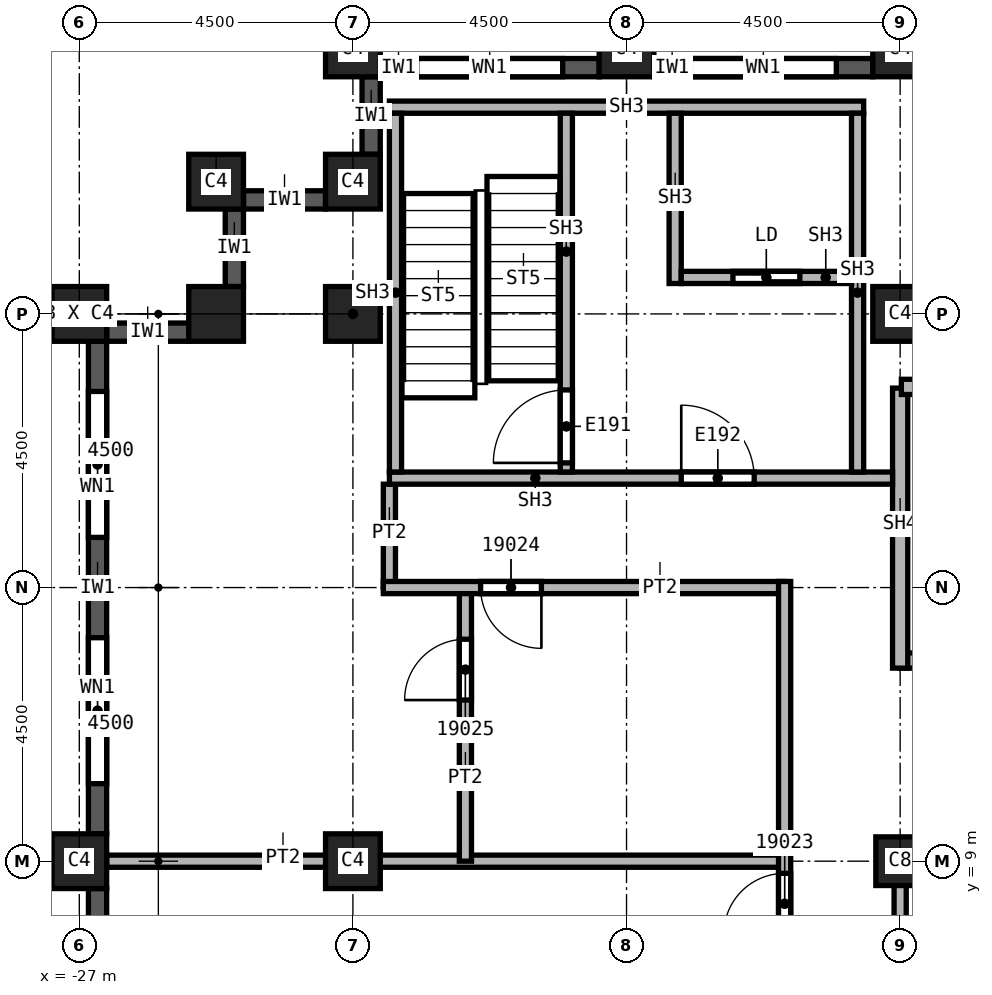
"""IFC4 building model, lengths in metres.
Left out: names, types, materials, properties, quantities, classifications, styles, units other than length and angle.
Written with IfcOpenShell. Run it as: python <this file> out.ifc"""

import sys

from ifc_helpers import new_model, si_unit, direction, frame, frame_2d, origin, origin_2d, place, context, subcontext, project, spatial, rectangle, extrude, element, fill, save


model = new_model("IFC4")
c1 = context("Model", 3, precision=1e-05, world=origin(), true_north=direction((0.0, 1.0)))
c2 = subcontext(c1, "Body", "Model", "MODEL_VIEW")
j1 = project(units=[si_unit("LENGTHUNIT", "METRE"), si_unit("PLANEANGLEUNIT", "RADIAN")], contexts=[c1])
p1 = place(None, origin())
s1 = spatial("IfcSite", under=j1, at=p1, CompositionType="ELEMENT")
p2 = place(p1, origin())
s2 = spatial("IfcBuilding", under=s1, at=p2, CompositionType="ELEMENT")
p3 = place(p2, frame((0.0, 0.0, 278.0)))
s3 = spatial("IfcBuildingStorey", under=s2, at=p3, CompositionType="ELEMENT", Elevation=278.0)
for number, where, z_axis, x_axis in (
    (1, (-13.5, 18.0, 0.0), (0.0, 0.0, 1.0), (1.0, 0.0, 0.0)),
    (2, (-22.5, 9.0, 0.0), (0.0, 0.0, 1.0), (1.0, 0.0, 0.0)),
    (3, (-22.5, 18.0, 0.0), (0.0, 0.0, 1.0), (1.0, 0.0, 0.0)),
):
    element("IfcColumn", number, at=place(p3, frame(where, z_axis=z_axis, x_axis=x_axis)), inside=s3, PredefinedType="COLUMN", context=c2, shape_type="SweptSolid", body=[
        extrude(rectangle(XDim=0.9, YDim=0.9, at=origin_2d()), origin(), (0.0, 0.0, 1.0), 3.72),
    ])
p4 = place(p3, frame((-13.5, 9.0, 0.0), z_axis=(0.0, 0.0, 1.0), x_axis=(1.0, 0.0, 0.0)))
e4 = element("IfcColumn", 4, at=p4, inside=s3, PredefinedType="COLUMN", context=c2, shape_type="SweptSolid", body=[
    extrude(rectangle(XDim=0.8, YDim=0.8, at=origin_2d()), origin(), (0.0, 0.0, 1.0), 3.72),
])
for number, where, z_axis, x_axis in (
    (5, (-13.5, 22.35, 0.0), (0.0, 0.0, 1.0), (1.0, 0.0, 0.0)),
    (6, (-18.0, 22.35, 0.0), (0.0, 0.0, 1.0), (1.0, 0.0, 0.0)),
    (7, (-22.5, 22.35, 0.0), (0.0, 0.0, 1.0), (1.0, 0.0, 0.0)),
    (8, (-27.0, 9.0, 0.0), (0.0, 0.0, 1.0), (0.0, 1.0, 0.0)),
    (9, (-27.0, 18.0, 0.0), (0.0, 0.0, 1.0), (0.0, 1.0, 0.0)),
    (10, (-22.5, 20.175, 0.0), (0.0, 0.0, 1.0), (1.0, 0.0, 0.0)),
    (11, (-24.75, 20.175, 0.0), (0.0, 0.0, 1.0), (1.0, 0.0, 0.0)),
    (12, (-24.75, 18.0, 0.0), (0.0, 0.0, 1.0), (1.0, 0.0, 0.0)),
):
    element("IfcColumn", number, at=place(p3, frame(where, z_axis=z_axis, x_axis=x_axis)), inside=s3, PredefinedType="COLUMN", context=c2, shape_type="SweptSolid", body=[
        extrude(rectangle(XDim=0.9, YDim=0.9, at=origin_2d()), origin(), (0.0, 0.0, 1.0), 3.72),
    ])
p5 = place(p3, frame((-24.45, 19.725, 0.0), z_axis=(0.0, 0.0, 1.0), x_axis=(0.0, -1.0, 0.0)))
e13 = element("IfcWall", 13, at=p5, inside=s3, PredefinedType="SOLIDWALL", context=c2, shape_type="SweptSolid", body=[
    extrude(rectangle(XDim=1.275, YDim=0.3, at=frame_2d((0.638, 0.0))), origin(), (0.0, 0.0, 1.0), 3.12),
])
p6 = place(p3, frame((-25.2, 17.7, 0.0), z_axis=(0.0, 0.0, 1.0), x_axis=(-1.0, 0.0, 0.0)))
e14 = element("IfcWall", 14, at=p6, inside=s3, PredefinedType="SOLIDWALL", context=c2, shape_type="SweptSolid", body=[
    extrude(rectangle(XDim=1.35, YDim=0.3, at=frame_2d((0.675, 0.0))), origin(), (0.0, 0.0, 1.0), 3.12),
])
p7 = place(p3, frame((-26.7, 17.55, 0.0), z_axis=(0.0, 0.0, 1.0), x_axis=(0.0, -1.0, 0.0)))
e15 = element("IfcWall", 15, at=p7, inside=s3, PredefinedType="SOLIDWALL", context=c2, shape_type="SweptSolid", body=[
    extrude(rectangle(XDim=8.1, YDim=0.3, at=frame_2d((4.05, 0.0))), origin(), (0.0, 0.0, 1.0), 3.12),
])
p8 = place(p7, frame((0.825, 0.0, 0.8)))
e16 = element("IfcOpeningElement", 16, at=p8, cuts=e15, PredefinedType="OPENING", context=c2, shape_type="SweptSolid", body=[
    extrude(rectangle(XDim=2.4, YDim=1.95, at=frame_2d((1.2, 0.975))), frame((0.0, 0.15, 0.0), z_axis=(0.0, -1.0, 0.0), x_axis=(1.0, 0.0, 0.0)), (0.0, 0.0, 1.0), 0.3),
])
p9 = place(p7, frame((4.875, 0.0, 0.8)))
e17 = element("IfcOpeningElement", 17, at=p9, cuts=e15, PredefinedType="OPENING", context=c2, shape_type="SweptSolid", body=[
    extrude(rectangle(XDim=2.4, YDim=1.95, at=frame_2d((1.2, 0.975))), frame((0.0, 0.15, 0.0), z_axis=(0.0, -1.0, 0.0), x_axis=(1.0, 0.0, 0.0)), (0.0, 0.0, 1.0), 0.3),
])
p10 = place(p3, frame((-26.7, 8.55, 0.0), z_axis=(0.0, 0.0, 1.0), x_axis=(0.0, -1.0, 0.0)))
e18 = element("IfcWall", 18, at=p10, inside=s3, PredefinedType="SOLIDWALL", context=c2, shape_type="SweptSolid", body=[
    extrude(rectangle(XDim=8.1, YDim=0.3, at=frame_2d((4.05, 0.0))), origin(), (0.0, 0.0, 1.0), 3.12),
])
p11 = place(p10, frame((0.825, 0.0, 0.8)))
e19 = element("IfcOpeningElement", 19, at=p11, cuts=e18, PredefinedType="OPENING", context=c2, shape_type="SweptSolid", body=[
    extrude(rectangle(XDim=2.4, YDim=1.95, at=frame_2d((1.2, 0.975))), frame((0.0, 0.15, 0.0), z_axis=(0.0, -1.0, 0.0), x_axis=(1.0, 0.0, 0.0)), (0.0, 0.0, 1.0), 0.3),
])
p12 = place(p10, frame((4.875, 0.0, 0.8)))
e20 = element("IfcOpeningElement", 20, at=p12, cuts=e18, PredefinedType="OPENING", context=c2, shape_type="SweptSolid", body=[
    extrude(rectangle(XDim=2.4, YDim=1.95, at=frame_2d((1.2, 0.975))), frame((0.0, 0.15, 0.0), z_axis=(0.0, -1.0, 0.0), x_axis=(1.0, 0.0, 0.0)), (0.0, 0.0, 1.0), 0.3),
])
p13 = place(p3, frame((-13.95, 22.05, 0.0), z_axis=(0.0, 0.0, 1.0), x_axis=(-1.0, 0.0, 0.0)))
e21 = element("IfcWall", 21, at=p13, inside=s3, PredefinedType="SOLIDWALL", context=c2, shape_type="SweptSolid", body=[
    extrude(rectangle(XDim=3.6, YDim=0.3, at=frame_2d((1.8, 0.0))), origin(), (0.0, 0.0, 1.0), 3.12),
])
p14 = place(p13, frame((0.6, 0.0, 0.8)))
e22 = element("IfcOpeningElement", 22, at=p14, cuts=e21, PredefinedType="OPENING", context=c2, shape_type="SweptSolid", body=[
    extrude(rectangle(XDim=2.4, YDim=1.95, at=frame_2d((1.2, 0.975))), frame((0.0, 0.15, 0.0), z_axis=(0.0, -1.0, 0.0), x_axis=(1.0, 0.0, 0.0)), (0.0, 0.0, 1.0), 0.3),
])
p15 = place(p3, frame((-18.45, 22.05, 0.0), z_axis=(0.0, 0.0, 1.0), x_axis=(-1.0, 0.0, 0.0)))
e23 = element("IfcWall", 23, at=p15, inside=s3, PredefinedType="SOLIDWALL", context=c2, shape_type="SweptSolid", body=[
    extrude(rectangle(XDim=3.6, YDim=0.3, at=frame_2d((1.8, 0.0))), origin(), (0.0, 0.0, 1.0), 3.12),
])
p16 = place(p15, frame((0.6, 0.0, 0.8)))
e24 = element("IfcOpeningElement", 24, at=p16, cuts=e23, PredefinedType="OPENING", context=c2, shape_type="SweptSolid", body=[
    extrude(rectangle(XDim=2.4, YDim=1.95, at=frame_2d((1.2, 0.975))), frame((0.0, 0.15, 0.0), z_axis=(0.0, -1.0, 0.0), x_axis=(1.0, 0.0, 0.0)), (0.0, 0.0, 1.0), 0.3),
])
p17 = place(p3, frame((-22.2, 21.9, 0.0), z_axis=(0.0, 0.0, 1.0), x_axis=(0.0, -1.0, 0.0)))
e25 = element("IfcWall", 25, at=p17, inside=s3, PredefinedType="SOLIDWALL", context=c2, shape_type="SweptSolid", body=[
    extrude(rectangle(XDim=1.275, YDim=0.3, at=frame_2d((0.637, 0.0))), origin(), (0.0, 0.0, 1.0), 3.12),
])
p18 = place(p3, frame((-22.95, 19.875, 0.0), z_axis=(0.0, 0.0, 1.0), x_axis=(-1.0, 0.0, 0.0)))
e26 = element("IfcWall", 26, at=p18, inside=s3, PredefinedType="SOLIDWALL", context=c2, shape_type="SweptSolid", body=[
    extrude(rectangle(XDim=1.35, YDim=0.3, at=frame_2d((0.675, 0.0))), origin(), (0.0, 0.0, 1.0), 3.12),
])
p19 = place(p3, frame((-26.55, 9.0, 0.0), z_axis=(0.0, 0.0, 1.0), x_axis=(1.0, 0.0, 0.0)))
e27 = element("IfcWall", 27, at=p19, inside=s3, PredefinedType="PARTITIONING", context=c2, shape_type="SweptSolid", body=[
    extrude(rectangle(XDim=11.15, YDim=0.2, at=frame_2d((5.575, 0.0))), origin(), (0.0, 0.0, 1.0), 3.72),
])
p20 = place(p3, frame((-21.9, 13.5, 0.0), z_axis=(0.0, 0.0, 1.0), x_axis=(0.0, 1.0, 0.0)))
e28 = element("IfcWall", 28, at=p20, inside=s3, PredefinedType="PARTITIONING", context=c2, shape_type="SweptSolid", body=[
    extrude(rectangle(XDim=1.7, YDim=0.2, at=frame_2d((0.85, 0.0))), origin(), (0.0, 0.0, 1.0), 3.72),
])
p21 = place(p3, frame((-20.65, 9.0, 0.0), z_axis=(0.0, 0.0, 1.0), x_axis=(0.0, 1.0, 0.0)))
e29 = element("IfcWall", 29, at=p21, inside=s3, PredefinedType="PARTITIONING", context=c2, shape_type="SweptSolid", body=[
    extrude(rectangle(XDim=4.5, YDim=0.2, at=frame_2d((2.25, 0.0))), origin(), (0.0, 0.0, 1.0), 3.72),
])
p22 = place(p21, frame((2.65, 0.0, 0.0)))
e30 = element("IfcOpeningElement", 30, at=p22, cuts=e29, PredefinedType="OPENING", context=c2, shape_type="SweptSolid", body=[
    extrude(rectangle(XDim=1.0, YDim=2.1, at=frame_2d((0.5, 1.05))), frame((0.0, 0.1, 0.0), z_axis=(0.0, -1.0, 0.0), x_axis=(1.0, 0.0, 0.0)), (0.0, 0.0, 1.0), 0.2),
])
p23 = place(p3, frame((-15.4, 13.5, 0.0), z_axis=(0.0, 0.0, 1.0), x_axis=(-1.0, 0.0, 0.0)))
e31 = element("IfcWall", 31, at=p23, inside=s3, PredefinedType="PARTITIONING", context=c2, shape_type="SweptSolid", body=[
    extrude(rectangle(XDim=6.6, YDim=0.2, at=frame_2d((3.3, 0.0))), origin(), (0.0, 0.0, 1.0), 3.72),
])
p24 = place(p23, frame((4.0, 0.0, 0.0)))
e32 = element("IfcOpeningElement", 32, at=p24, cuts=e31, PredefinedType="OPENING", context=c2, shape_type="SweptSolid", body=[
    extrude(rectangle(XDim=1.0, YDim=2.1, at=frame_2d((0.5, 1.05))), frame((0.0, 0.1, 0.0), z_axis=(0.0, -1.0, 0.0), x_axis=(1.0, 0.0, 0.0)), (0.0, 0.0, 1.0), 0.2),
])
p25 = place(p3, frame((-15.4, -21.9, 0.0), z_axis=(0.0, 0.0, 1.0), x_axis=(0.0, 1.0, 0.0)))
e33 = element("IfcWall", 33, at=p25, inside=s3, PredefinedType="PARTITIONING", context=c2, shape_type="SweptSolid", body=[
    extrude(rectangle(XDim=35.5, YDim=0.2, at=frame_2d((17.75, 0.0))), origin(), (0.0, 0.0, 1.0), 3.72),
])
p26 = place(p25, frame((22.05, 0.0, 0.0)))
e34 = element("IfcOpeningElement", 34, at=p26, cuts=e33, PredefinedType="OPENING", context=c2, shape_type="SweptSolid", body=[
    extrude(rectangle(XDim=1.0, YDim=2.1, at=frame_2d((0.5, 1.05))), frame((0.0, 0.1, 0.0), z_axis=(0.0, -1.0, 0.0), x_axis=(1.0, 0.0, 0.0)), (0.0, 0.0, 1.0), 0.2),
])
p27 = place(p25, frame((29.7, 0.0, 0.0)))
e35 = element("IfcOpeningElement", 35, at=p27, cuts=e33, PredefinedType="OPENING", context=c2, shape_type="SweptSolid", body=[
    extrude(rectangle(XDim=1.0, YDim=2.1, at=frame_2d((0.5, 1.05))), frame((0.0, 0.1, 0.0), z_axis=(0.0, -1.0, 0.0), x_axis=(1.0, 0.0, 0.0)), (0.0, 0.0, 1.0), 0.2),
])
p28 = place(p25, frame((1.0, 0.0, 0.0)))
e36 = element("IfcOpeningElement", 36, at=p28, cuts=e33, PredefinedType="OPENING", context=c2, shape_type="SweptSolid", body=[
    extrude(rectangle(XDim=1.0, YDim=2.1, at=frame_2d((0.5, 1.05))), frame((0.0, 0.1, 0.0), z_axis=(0.0, -1.0, 0.0), x_axis=(1.0, 0.0, 0.0)), (0.0, 0.0, 1.0), 0.2),
])
p29 = place(p25, frame((3.15, 0.0, 0.0)))
e37 = element("IfcOpeningElement", 37, at=p29, cuts=e33, PredefinedType="OPENING", context=c2, shape_type="SweptSolid", body=[
    extrude(rectangle(XDim=1.0, YDim=2.1, at=frame_2d((0.5, 1.05))), frame((0.0, 0.1, 0.0), z_axis=(0.0, -1.0, 0.0), x_axis=(1.0, 0.0, 0.0)), (0.0, 0.0, 1.0), 0.2),
])
p30 = place(p25, frame((8.4, 0.0, 0.0)))
e38 = element("IfcOpeningElement", 38, at=p30, cuts=e33, PredefinedType="OPENING", context=c2, shape_type="SweptSolid", body=[
    extrude(rectangle(XDim=1.0, YDim=2.1, at=frame_2d((0.5, 1.05))), frame((0.0, 0.1, 0.0), z_axis=(0.0, -1.0, 0.0), x_axis=(1.0, 0.0, 0.0)), (0.0, 0.0, 1.0), 0.2),
])
p31 = place(p25, frame((17.25, 0.0, 0.0)))
e39 = element("IfcOpeningElement", 39, at=p31, cuts=e33, PredefinedType="OPENING", context=c2, shape_type="SweptSolid", body=[
    extrude(rectangle(XDim=1.0, YDim=2.1, at=frame_2d((0.5, 1.05))), frame((0.0, 0.1, 0.0), z_axis=(0.0, -1.0, 0.0), x_axis=(1.0, 0.0, 0.0)), (0.0, 0.0, 1.0), 0.2),
])
p32 = place(p25, frame((20.625, 0.0, 0.0)))
e40 = element("IfcOpeningElement", 40, at=p32, cuts=e33, PredefinedType="OPENING", context=c2, shape_type="SweptSolid", body=[
    extrude(rectangle(XDim=1.0, YDim=2.1, at=frame_2d((0.5, 1.05))), frame((0.0, 0.1, 0.0), z_axis=(0.0, -1.0, 0.0), x_axis=(1.0, 0.0, 0.0)), (0.0, 0.0, 1.0), 0.2),
])
p33 = place(p3, frame((-13.5, 6.0, 0.0), z_axis=(0.0, 0.0, 1.0), x_axis=(0.0, 1.0, 0.0)))
e41 = element("IfcWall", 41, at=p33, inside=s3, PredefinedType="SOLIDWALL", context=c2, shape_type="SweptSolid", body=[
    extrude(rectangle(XDim=3.1, YDim=0.2, at=frame_2d((1.55, 0.0))), origin(), (0.0, 0.0, 1.0), 3.042),
])
p34 = place(p3, frame((-13.5, 9.0, 0.0), z_axis=(0.0, 0.0, 1.0), x_axis=(1.0, 0.0, 0.0)))
e42 = element("IfcWall", 42, at=p34, inside=s3, PredefinedType="SOLIDWALL", context=c2, shape_type="SweptSolid", body=[
    extrude(rectangle(XDim=3.0, YDim=0.2, at=frame_2d((1.5, 0.0))), origin(), (0.0, 0.0, 1.0), 3.042),
])
p35 = place(p3, frame((-13.5, 12.3, 0.0), z_axis=(0.0, 0.0, 1.0), x_axis=(1.0, 0.0, 0.0)))
e43 = element("IfcWall", 43, at=p35, inside=s3, PredefinedType="SOLIDWALL", context=c2, shape_type="SweptSolid", body=[
    extrude(rectangle(XDim=9.125, YDim=0.25, at=frame_2d((4.562, 0.0))), origin(), (0.0, 0.0, 1.0), 3.72),
])
p36 = place(p35, frame((0.6, 0.0, 0.0)))
e44 = element("IfcOpeningElement", 44, at=p36, cuts=e43, PredefinedType="OPENING", context=c2, shape_type="SweptSolid", body=[
    extrude(rectangle(XDim=1.2, YDim=2.1, at=frame_2d((0.6, 1.05))), frame((0.0, 0.125, 0.0), z_axis=(0.0, -1.0, 0.0), x_axis=(1.0, 0.0, 0.0)), (0.0, 0.0, 1.0), 0.25),
])
p37 = place(p3, frame((-13.5, 16.78, 0.0), z_axis=(0.0, 0.0, 1.0), x_axis=(0.0, -1.0, 0.0)))
e45 = element("IfcWall", 45, at=p37, inside=s3, PredefinedType="SOLIDWALL", context=c2, shape_type="SweptSolid", body=[
    extrude(rectangle(XDim=4.605, YDim=0.25, at=frame_2d((2.302, 0.0))), origin(), (0.0, 0.0, 1.0), 3.72),
])
p38 = place(p3, frame((-13.48, 16.8, 0.0), z_axis=(0.0, 0.0, 1.0), x_axis=(1.0, 0.0, 0.0)))
e46 = element("IfcWall", 46, at=p38, inside=s3, PredefinedType="SOLIDWALL", context=c2, shape_type="SweptSolid", body=[
    extrude(rectangle(XDim=8.96, YDim=0.25, at=frame_2d((4.48, 0.0))), origin(), (0.0, 0.0, 1.0), 3.72),
])
p39 = place(p3, frame((-21.9, 15.3, 0.0), z_axis=(0.0, 0.0, 1.0), x_axis=(1.0, 0.0, 0.0)))
e47 = element("IfcWall", 47, at=p39, inside=s3, PredefinedType="SOLIDWALL", context=c2, shape_type="SweptSolid", body=[
    extrude(rectangle(XDim=8.275, YDim=0.2, at=frame_2d((4.137, 0.0))), origin(), (0.0, 0.0, 1.0), 3.72),
])
p40 = place(p39, frame((4.8, 0.0, 0.0)))
e48 = element("IfcOpeningElement", 48, at=p40, cuts=e47, PredefinedType="OPENING", context=c2, shape_type="SweptSolid", body=[
    extrude(rectangle(XDim=1.2, YDim=2.1, at=frame_2d((0.6, 1.05))), frame((0.0, 0.1, 0.0), z_axis=(0.0, -1.0, 0.0), x_axis=(1.0, 0.0, 0.0)), (0.0, 0.0, 1.0), 0.2),
])
p41 = place(p3, frame((-21.9, 21.4, 0.0), z_axis=(0.0, 0.0, 1.0), x_axis=(1.0, 0.0, 0.0)))
e49 = element("IfcWall", 49, at=p41, inside=s3, PredefinedType="SOLIDWALL", context=c2, shape_type="SweptSolid", body=[
    extrude(rectangle(XDim=7.8, YDim=0.2, at=frame_2d((3.9, 0.0))), origin(), (0.0, 0.0, 1.0), 3.72),
])
for number, where, z_axis, x_axis in (
    (50, (-21.8, 15.4, 0.0), (0.0, 0.0, 1.0), (0.0, 1.0, 0.0)),
    (51, (-14.2, 15.4, 0.0), (0.0, 0.0, 1.0), (0.0, 1.0, 0.0)),
):
    element("IfcWall", number, at=place(p3, frame(where, z_axis=z_axis, x_axis=x_axis)), inside=s3, PredefinedType="SOLIDWALL", context=c2, shape_type="SweptSolid", body=[
        extrude(rectangle(XDim=5.9, YDim=0.2, at=frame_2d((2.95, 0.0))), origin(), (0.0, 0.0, 1.0), 3.72),
    ])
p42 = place(p3, frame((-18.99, 15.4, 0.0), z_axis=(0.0, 0.0, 1.0), x_axis=(0.0, 1.0, 0.0)))
e52 = element("IfcWall", 52, at=p42, inside=s3, PredefinedType="SOLIDWALL", context=c2, shape_type="SweptSolid", body=[
    extrude(rectangle(XDim=5.9, YDim=0.2, at=frame_2d((2.95, 0.0))), origin(), (0.0, 0.0, 1.0), 3.72),
])
p43 = place(p42, frame((0.15, 0.0, 0.0)))
e53 = element("IfcOpeningElement", 53, at=p43, cuts=e52, PredefinedType="OPENING", context=c2, shape_type="SweptSolid", body=[
    extrude(rectangle(XDim=1.2, YDim=2.1, at=frame_2d((0.6, 1.05))), frame((0.0, 0.1, 0.0), z_axis=(0.0, -1.0, 0.0), x_axis=(1.0, 0.0, 0.0)), (0.0, 0.0, 1.0), 0.2),
])
p44 = place(p3, frame((-17.2, 18.5, 0.0), z_axis=(0.0, 0.0, 1.0), x_axis=(0.0, 1.0, 0.0)))
e54 = element("IfcWall", 54, at=p44, inside=s3, PredefinedType="SOLIDWALL", context=c2, shape_type="SweptSolid", body=[
    extrude(rectangle(XDim=2.8, YDim=0.2, at=frame_2d((1.4, 0.0))), origin(), (0.0, 0.0, 1.0), 3.72),
])
p45 = place(p3, frame((-17.1, 18.6, 0.0), z_axis=(0.0, 0.0, 1.0), x_axis=(1.0, 0.0, 0.0)))
e55 = element("IfcWall", 55, at=p45, inside=s3, PredefinedType="SOLIDWALL", context=c2, shape_type="SweptSolid", body=[
    extrude(rectangle(XDim=2.8, YDim=0.2, at=frame_2d((1.4, 0.0))), origin(), (0.0, 0.0, 1.0), 3.72),
])
p46 = place(p45, frame((0.85, 0.0, 0.0)))
e56 = element("IfcOpeningElement", 56, at=p46, cuts=e55, PredefinedType="OPENING", context=c2, shape_type="SweptSolid", body=[
    extrude(rectangle(XDim=1.1, YDim=2.1, at=frame_2d((0.55, 1.05))), frame((0.0, 0.1, 0.0), z_axis=(0.0, -1.0, 0.0), x_axis=(1.0, 0.0, 0.0)), (0.0, 0.0, 1.0), 0.2),
])
p47 = place(p8, origin())
e57 = element("IfcWindow", 57, at=p47, inside=s3, PartitioningType="SINGLE_PANEL", PredefinedType="WINDOW", context=c2, shape_type="SweptSolid", body=[
    extrude(rectangle(XDim=2.4, YDim=1.95, at=frame_2d((1.2, 0.975))), frame((0.0, 0.03, 0.0), z_axis=(0.0, -1.0, 0.0), x_axis=(1.0, 0.0, 0.0)), (0.0, 0.0, 1.0), 0.06),
])
fill(e16, e57)
p48 = place(p9, origin())
e58 = element("IfcWindow", 58, at=p48, inside=s3, PartitioningType="SINGLE_PANEL", PredefinedType="WINDOW", context=c2, shape_type="SweptSolid", body=[
    extrude(rectangle(XDim=2.4, YDim=1.95, at=frame_2d((1.2, 0.975))), frame((0.0, 0.03, 0.0), z_axis=(0.0, -1.0, 0.0), x_axis=(1.0, 0.0, 0.0)), (0.0, 0.0, 1.0), 0.06),
])
fill(e17, e58)
p49 = place(p14, origin())
e59 = element("IfcWindow", 59, at=p49, inside=s3, PartitioningType="SINGLE_PANEL", PredefinedType="WINDOW", context=c2, shape_type="SweptSolid", body=[
    extrude(rectangle(XDim=2.4, YDim=1.95, at=frame_2d((1.2, 0.975))), frame((0.0, 0.03, 0.0), z_axis=(0.0, -1.0, 0.0), x_axis=(1.0, 0.0, 0.0)), (0.0, 0.0, 1.0), 0.06),
])
fill(e22, e59)
p50 = place(p16, origin())
e60 = element("IfcWindow", 60, at=p50, inside=s3, PartitioningType="SINGLE_PANEL", PredefinedType="WINDOW", context=c2, shape_type="SweptSolid", body=[
    extrude(rectangle(XDim=2.4, YDim=1.95, at=frame_2d((1.2, 0.975))), frame((0.0, 0.03, 0.0), z_axis=(0.0, -1.0, 0.0), x_axis=(1.0, 0.0, 0.0)), (0.0, 0.0, 1.0), 0.06),
])
fill(e24, e60)
p51 = place(p27, origin())
e61 = element("IfcDoor", 61, at=p51, inside=s3, OperationType="SINGLE_SWING_RIGHT", PredefinedType="DOOR", context=c2, shape_type="SweptSolid", body=[
    extrude(rectangle(XDim=1.0, YDim=2.1, at=frame_2d((0.5, 1.05))), frame((0.0, 0.025, 0.0), z_axis=(0.0, -1.0, 0.0), x_axis=(1.0, 0.0, 0.0)), (0.0, 0.0, 1.0), 0.05),
])
fill(e35, e61)
p52 = place(p24, origin())
e62 = element("IfcDoor", 62, at=p52, inside=s3, OperationType="SINGLE_SWING_LEFT", PredefinedType="DOOR", context=c2, shape_type="SweptSolid", body=[
    extrude(rectangle(XDim=1.0, YDim=2.1, at=frame_2d((0.5, 1.05))), frame((0.0, 0.025, 0.0), z_axis=(0.0, -1.0, 0.0), x_axis=(1.0, 0.0, 0.0)), (0.0, 0.0, 1.0), 0.05),
])
fill(e32, e62)
p53 = place(p22, origin())
e63 = element("IfcDoor", 63, at=p53, inside=s3, OperationType="SINGLE_SWING_RIGHT", PredefinedType="DOOR", context=c2, shape_type="SweptSolid", body=[
    extrude(rectangle(XDim=1.0, YDim=2.1, at=frame_2d((0.5, 1.05))), frame((0.0, 0.025, 0.0), z_axis=(0.0, -1.0, 0.0), x_axis=(1.0, 0.0, 0.0)), (0.0, 0.0, 1.0), 0.05),
])
fill(e30, e63)
p54 = place(p43, origin())
e64 = element("IfcDoor", 64, at=p54, inside=s3, OperationType="SINGLE_SWING_LEFT", PredefinedType="DOOR", context=c2, shape_type="SweptSolid", body=[
    extrude(rectangle(XDim=1.2, YDim=2.1, at=frame_2d((0.6, 1.05))), frame((0.0, 0.025, 0.0), z_axis=(0.0, -1.0, 0.0), x_axis=(1.0, 0.0, 0.0)), (0.0, 0.0, 1.0), 0.05),
])
fill(e53, e64)
p55 = place(p46, origin())
e65 = element("IfcDoor", 65, at=p55, inside=s3, OperationType="SLIDING_TO_LEFT", PredefinedType="DOOR", context=c2, shape_type="SweptSolid", body=[
    extrude(rectangle(XDim=1.1, YDim=2.1, at=frame_2d((0.55, 1.05))), frame((0.0, 0.025, 0.0), z_axis=(0.0, -1.0, 0.0), x_axis=(1.0, 0.0, 0.0)), (0.0, 0.0, 1.0), 0.05),
])
fill(e56, e65)
p56 = place(p40, origin())
e66 = element("IfcDoor", 66, at=p56, inside=s3, OperationType="SINGLE_SWING_RIGHT", PredefinedType="DOOR", context=c2, shape_type="SweptSolid", body=[
    extrude(rectangle(XDim=1.2, YDim=2.1, at=frame_2d((0.6, 1.05))), frame((0.0, 0.025, 0.0), z_axis=(0.0, -1.0, 0.0), x_axis=(1.0, 0.0, 0.0)), (0.0, 0.0, 1.0), 0.05),
])
fill(e48, e66)
save(model, sys.argv[1])
